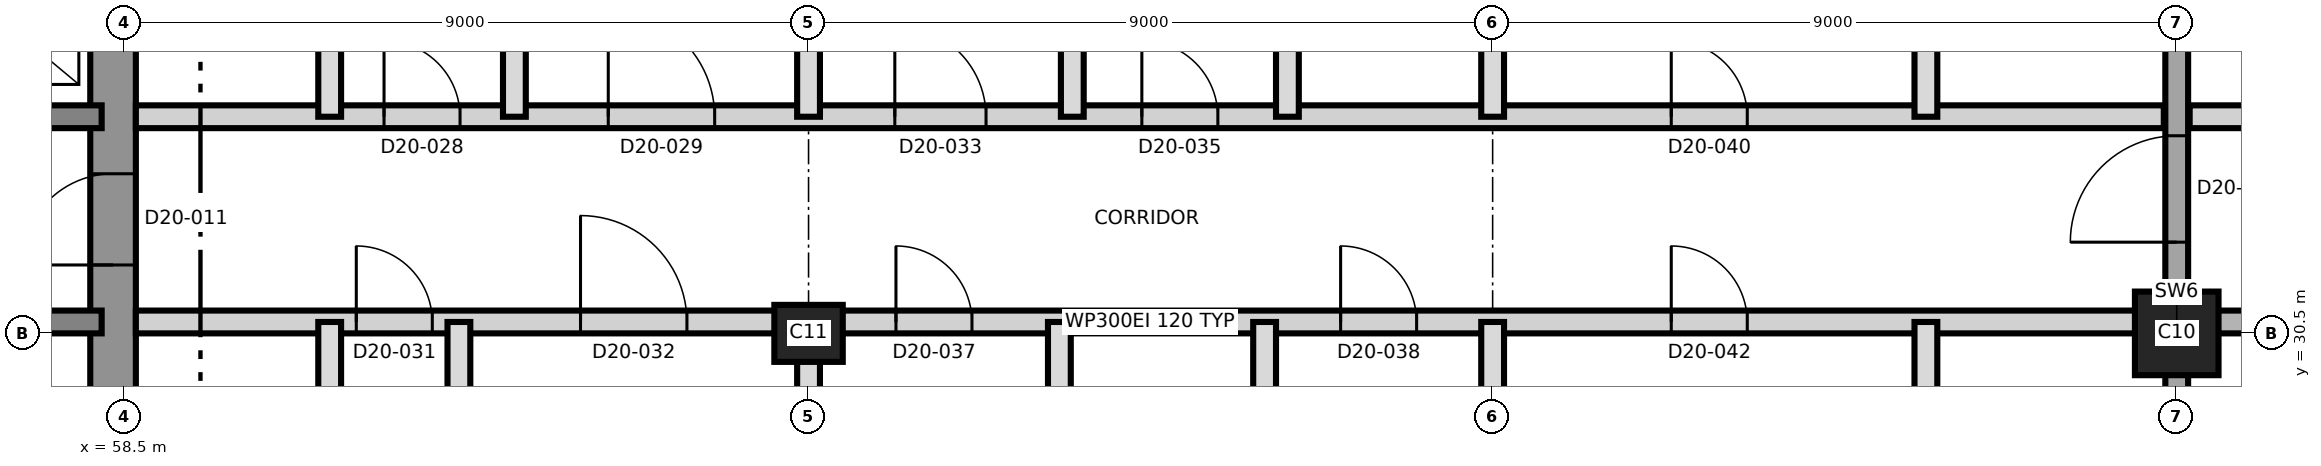
"""IFC4 building model, lengths in metres.
Left out: names, types, materials, properties, quantities, classifications, styles, units other than length and angle.
Written with IfcOpenShell. Run it as: python <this file> out.ifc"""

import sys

from ifc_helpers import new_model, si_unit, direction, frame, frame_2d, origin, origin_2d, place, context, subcontext, project, spatial, rectangle, extrude, element, fill, save


model = new_model("IFC4")
c1 = context("Model", 3, precision=1e-05, world=origin(), true_north=direction((0.0, 1.0)))
c2 = subcontext(c1, "Body", "Model", "MODEL_VIEW")
j1 = project(units=[si_unit("LENGTHUNIT", "METRE"), si_unit("PLANEANGLEUNIT", "RADIAN")], contexts=[c1])
p1 = place(None, origin())
s1 = spatial("IfcSite", under=j1, at=p1, CompositionType="ELEMENT")
p2 = place(p1, origin())
s2 = spatial("IfcBuilding", under=s1, at=p2, CompositionType="ELEMENT")
p3 = place(p2, frame((0.0, 0.0, 186.6)))
s3 = spatial("IfcBuildingStorey", under=s2, at=p3, CompositionType="ELEMENT", Elevation=186.6)
p4 = place(p3, frame((58.35, 21.2, 0.0), z_axis=(0.0, 0.0, 1.0), x_axis=(0.0, 1.0, 0.0)))
e1 = element("IfcWall", 1, at=p4, inside=s3, PredefinedType="SHEAR", context=c2, shape_type="SweptSolid", body=[
    extrude(rectangle(XDim=18.6, YDim=0.6, at=frame_2d((9.3, 0.0))), origin(), (0.0, 0.0, 1.0), 3.7),
])
p5 = place(p4, frame((10.2, 0.0, 0.0)))
e2 = element("IfcOpeningElement", 2, at=p5, cuts=e1, PredefinedType="OPENING", context=c2, shape_type="SweptSolid", body=[
    extrude(rectangle(XDim=1.2, YDim=2.1, at=frame_2d((0.6, 1.05))), frame((0.0, 0.31, 0.0), z_axis=(0.0, -1.0, 0.0), x_axis=(1.0, 0.0, 0.0)), (0.0, 0.0, 1.0), 0.62),
])
p6 = place(p3, frame((31.8, 30.65, 0.0), z_axis=(0.0, 0.0, 1.0), x_axis=(1.0, 0.0, 0.0)))
e3 = element("IfcWall", 3, at=p6, inside=s3, PredefinedType="SHEAR", context=c2, shape_type="SweptSolid", body=[
    extrude(rectangle(XDim=26.4, YDim=0.3, at=frame_2d((13.2, 0.0))), origin(), (0.0, 0.0, 1.0), 3.7),
])
p7 = place(p6, frame((24.7, 0.0, 0.0)))
e4 = element("IfcOpeningElement", 4, at=p7, cuts=e3, PredefinedType="OPENING", context=c2, shape_type="SweptSolid", body=[
    extrude(rectangle(XDim=1.0, YDim=2.1, at=frame_2d((0.5, 1.05))), frame((0.0, 0.16, 0.0), z_axis=(0.0, -1.0, 0.0), x_axis=(1.0, 0.0, 0.0)), (0.0, 0.0, 1.0), 0.32),
])
p8 = place(p6, frame((4.0, 0.0, 0.0)))
e5 = element("IfcOpeningElement", 5, at=p8, cuts=e3, PredefinedType="OPENING", context=c2, shape_type="SweptSolid", body=[
    extrude(rectangle(XDim=1.0, YDim=2.1, at=frame_2d((0.5, 1.05))), frame((0.0, 0.16, 0.0), z_axis=(0.0, -1.0, 0.0), x_axis=(1.0, 0.0, 0.0)), (0.0, 0.0, 1.0), 0.32),
])
p9 = place(p3, frame((31.8, 33.35, 0.0), z_axis=(0.0, 0.0, 1.0), x_axis=(1.0, 0.0, 0.0)))
e6 = element("IfcWall", 6, at=p9, inside=s3, PredefinedType="SHEAR", context=c2, shape_type="SweptSolid", body=[
    extrude(rectangle(XDim=26.4, YDim=0.3, at=frame_2d((13.2, 0.0))), origin(), (0.0, 0.0, 1.0), 3.7),
])
p10 = place(p9, frame((13.85, 0.0, 0.0)))
e7 = element("IfcOpeningElement", 7, at=p10, cuts=e6, PredefinedType="OPENING", context=c2, shape_type="SweptSolid", body=[
    extrude(rectangle(XDim=1.4, YDim=2.1, at=frame_2d((0.7, 1.05))), frame((0.0, 0.16, 0.0), z_axis=(0.0, -1.0, 0.0), x_axis=(1.0, 0.0, 0.0)), (0.0, 0.0, 1.0), 0.32),
])
p11 = place(p9, frame((5.325, 0.0, 0.0)))
e8 = element("IfcOpeningElement", 8, at=p11, cuts=e6, PredefinedType="OPENING", context=c2, shape_type="SweptSolid", body=[
    extrude(rectangle(XDim=1.2, YDim=2.1, at=frame_2d((0.6, 1.05))), frame((0.0, 0.16, 0.0), z_axis=(0.0, -1.0, 0.0), x_axis=(1.0, 0.0, 0.0)), (0.0, 0.0, 1.0), 0.32),
])
p12 = place(p9, frame((19.875, 0.0, 0.0)))
e9 = element("IfcOpeningElement", 9, at=p12, cuts=e6, PredefinedType="OPENING", context=c2, shape_type="SweptSolid", body=[
    extrude(rectangle(XDim=1.2, YDim=2.1, at=frame_2d((0.6, 1.05))), frame((0.0, 0.16, 0.0), z_axis=(0.0, -1.0, 0.0), x_axis=(1.0, 0.0, 0.0)), (0.0, 0.0, 1.0), 0.32),
])
p13 = place(p3, frame((67.5, 30.5, 0.0), z_axis=(0.0, 0.0, 1.0), x_axis=(1.0, 0.0, 0.0)))
e10 = element("IfcColumn", 10, at=p13, inside=s3, PredefinedType="COLUMN", context=c2, shape_type="SweptSolid", body=[
    extrude(rectangle(XDim=0.9, YDim=0.75, at=origin_2d()), origin(), (0.0, 0.0, 1.0), 3.7),
])
p14 = place(p3, frame((85.5, 30.5, 0.0), z_axis=(0.0, 0.0, 1.0), x_axis=(1.0, 0.0, 0.0)))
e11 = element("IfcColumn", 11, at=p14, inside=s3, PredefinedType="COLUMN", context=c2, shape_type="SweptSolid", body=[
    extrude(rectangle(XDim=1.1, YDim=1.1, at=origin_2d()), origin(), (0.0, 0.0, 1.0), 3.7),
])
p15 = place(p3, frame((85.5, 19.17, 0.0), z_axis=(0.0, 0.0, 1.0), x_axis=(0.0, 1.0, 0.0)))
e12 = element("IfcWall", 12, at=p15, inside=s3, PredefinedType="SHEAR", context=c2, shape_type="SweptSolid", body=[
    extrude(rectangle(XDim=22.66, YDim=0.3, at=frame_2d((11.33, 0.0))), origin(), (0.0, 0.0, 1.0), 3.7),
])
p16 = place(p15, frame((12.53, 0.0, 0.0)))
e13 = element("IfcOpeningElement", 13, at=p16, cuts=e12, PredefinedType="OPENING", context=c2, shape_type="SweptSolid", body=[
    extrude(rectangle(XDim=1.4, YDim=2.1, at=frame_2d((0.7, 1.05))), frame((0.0, 0.16, 0.0), z_axis=(0.0, -1.0, 0.0), x_axis=(1.0, 0.0, 0.0)), (0.0, 0.0, 1.0), 0.32),
])
p17 = place(p3, frame((58.65, 30.65, 0.0), z_axis=(0.0, 0.0, 1.0), x_axis=(1.0, 0.0, 0.0)))
e14 = element("IfcWall", 14, at=p17, inside=s3, PredefinedType="PARTITIONING", context=c2, shape_type="SweptSolid", body=[
    extrude(rectangle(XDim=26.68, YDim=0.3, at=frame_2d((13.34, 0.0))), origin(), (0.0, 0.0, 1.0), 3.4),
])
p18 = place(p17, frame((2.9, 0.0, 0.0)))
e15 = element("IfcOpeningElement", 15, at=p18, cuts=e14, PredefinedType="OPENING", context=c2, shape_type="SweptSolid", body=[
    extrude(rectangle(XDim=1.0, YDim=2.1, at=frame_2d((0.5, 1.05))), frame((0.0, 0.16, 0.0), z_axis=(0.0, -1.0, 0.0), x_axis=(1.0, 0.0, 0.0)), (0.0, 0.0, 1.0), 0.32),
])
p19 = place(p17, frame((5.85, 0.0, 0.0)))
e16 = element("IfcOpeningElement", 16, at=p19, cuts=e14, PredefinedType="OPENING", context=c2, shape_type="SweptSolid", body=[
    extrude(rectangle(XDim=1.4, YDim=2.1, at=frame_2d((0.7, 1.05))), frame((0.0, 0.16, 0.0), z_axis=(0.0, -1.0, 0.0), x_axis=(1.0, 0.0, 0.0)), (0.0, 0.0, 1.0), 0.32),
])
p20 = place(p17, frame((10.0, 0.0, 0.0)))
e17 = element("IfcOpeningElement", 17, at=p20, cuts=e14, PredefinedType="OPENING", context=c2, shape_type="SweptSolid", body=[
    extrude(rectangle(XDim=1.0, YDim=2.1, at=frame_2d((0.5, 1.05))), frame((0.0, 0.16, 0.0), z_axis=(0.0, -1.0, 0.0), x_axis=(1.0, 0.0, 0.0)), (0.0, 0.0, 1.0), 0.32),
])
p21 = place(p17, frame((15.85, 0.0, 0.0)))
e18 = element("IfcOpeningElement", 18, at=p21, cuts=e14, PredefinedType="OPENING", context=c2, shape_type="SweptSolid", body=[
    extrude(rectangle(XDim=1.0, YDim=2.1, at=frame_2d((0.5, 1.05))), frame((0.0, 0.16, 0.0), z_axis=(0.0, -1.0, 0.0), x_axis=(1.0, 0.0, 0.0)), (0.0, 0.0, 1.0), 0.32),
])
p22 = place(p17, frame((20.2, 0.0, 0.0)))
e19 = element("IfcOpeningElement", 19, at=p22, cuts=e14, PredefinedType="OPENING", context=c2, shape_type="SweptSolid", body=[
    extrude(rectangle(XDim=1.0, YDim=2.1, at=frame_2d((0.5, 1.05))), frame((0.0, 0.16, 0.0), z_axis=(0.0, -1.0, 0.0), x_axis=(1.0, 0.0, 0.0)), (0.0, 0.0, 1.0), 0.32),
])
p23 = place(p3, frame((85.67, 30.65, 0.0), z_axis=(0.0, 0.0, 1.0), x_axis=(1.0, 0.0, 0.0)))
e20 = element("IfcWall", 20, at=p23, inside=s3, PredefinedType="SHEAR", context=c2, shape_type="SweptSolid", body=[
    extrude(rectangle(XDim=9.58, YDim=0.3, at=frame_2d((4.79, 0.0))), origin(), (0.0, 0.0, 1.0), 3.4),
])
p24 = place(p23, frame((2.08, 0.0, 0.0)))
e21 = element("IfcOpeningElement", 21, at=p24, cuts=e20, PredefinedType="OPENING", context=c2, shape_type="SweptSolid", body=[
    extrude(rectangle(XDim=1.2, YDim=2.1, at=frame_2d((0.6, 1.05))), frame((0.0, 0.16, 0.0), z_axis=(0.0, -1.0, 0.0), x_axis=(1.0, 0.0, 0.0)), (0.0, 0.0, 1.0), 0.32),
])
p25 = place(p23, frame((5.63, 0.0, 0.0)))
e22 = element("IfcOpeningElement", 22, at=p25, cuts=e20, PredefinedType="OPENING", context=c2, shape_type="SweptSolid", body=[
    extrude(rectangle(XDim=1.0, YDim=2.1, at=frame_2d((0.5, 1.05))), frame((0.0, 0.16, 0.0), z_axis=(0.0, -1.0, 0.0), x_axis=(1.0, 0.0, 0.0)), (0.0, 0.0, 1.0), 0.32),
])
p26 = place(p3, frame((58.65, 33.35, 0.0), z_axis=(0.0, 0.0, 1.0), x_axis=(1.0, 0.0, 0.0)))
e23 = element("IfcWall", 23, at=p26, inside=s3, PredefinedType="PARTITIONING", context=c2, shape_type="SweptSolid", body=[
    extrude(rectangle(XDim=26.68, YDim=0.3, at=frame_2d((13.34, 0.0))), origin(), (0.0, 0.0, 1.0), 3.4),
])
p27 = place(p26, frame((3.265, 0.0, 0.0)))
e24 = element("IfcOpeningElement", 24, at=p27, cuts=e23, PredefinedType="OPENING", context=c2, shape_type="SweptSolid", body=[
    extrude(rectangle(XDim=1.0, YDim=2.1, at=frame_2d((0.5, 1.05))), frame((0.0, 0.16, 0.0), z_axis=(0.0, -1.0, 0.0), x_axis=(1.0, 0.0, 0.0)), (0.0, 0.0, 1.0), 0.32),
])
p28 = place(p26, frame((6.215, 0.0, 0.0)))
e25 = element("IfcOpeningElement", 25, at=p28, cuts=e23, PredefinedType="OPENING", context=c2, shape_type="SweptSolid", body=[
    extrude(rectangle(XDim=1.4, YDim=2.1, at=frame_2d((0.7, 1.05))), frame((0.0, 0.16, 0.0), z_axis=(0.0, -1.0, 0.0), x_axis=(1.0, 0.0, 0.0)), (0.0, 0.0, 1.0), 0.32),
])
p29 = place(p26, frame((9.985, 0.0, 0.0)))
e26 = element("IfcOpeningElement", 26, at=p29, cuts=e23, PredefinedType="OPENING", context=c2, shape_type="SweptSolid", body=[
    extrude(rectangle(XDim=1.2, YDim=2.1, at=frame_2d((0.6, 1.05))), frame((0.0, 0.16, 0.0), z_axis=(0.0, -1.0, 0.0), x_axis=(1.0, 0.0, 0.0)), (0.0, 0.0, 1.0), 0.32),
])
p30 = place(p26, frame((13.235, 0.0, 0.0)))
e27 = element("IfcOpeningElement", 27, at=p30, cuts=e23, PredefinedType="OPENING", context=c2, shape_type="SweptSolid", body=[
    extrude(rectangle(XDim=1.0, YDim=2.1, at=frame_2d((0.5, 1.05))), frame((0.0, 0.16, 0.0), z_axis=(0.0, -1.0, 0.0), x_axis=(1.0, 0.0, 0.0)), (0.0, 0.0, 1.0), 0.32),
])
p31 = place(p26, frame((20.2, 0.0, 0.0)))
e28 = element("IfcOpeningElement", 28, at=p31, cuts=e23, PredefinedType="OPENING", context=c2, shape_type="SweptSolid", body=[
    extrude(rectangle(XDim=1.0, YDim=2.1, at=frame_2d((0.5, 1.05))), frame((0.0, 0.16, 0.0), z_axis=(0.0, -1.0, 0.0), x_axis=(1.0, 0.0, 0.0)), (0.0, 0.0, 1.0), 0.32),
])
p32 = place(p3, frame((85.67, 33.35, 0.0), z_axis=(0.0, 0.0, 1.0), x_axis=(1.0, 0.0, 0.0)))
e29 = element("IfcWall", 29, at=p32, inside=s3, PredefinedType="PARTITIONING", context=c2, shape_type="SweptSolid", body=[
    extrude(rectangle(XDim=9.58, YDim=0.3, at=frame_2d((4.79, 0.0))), origin(), (0.0, 0.0, 1.0), 3.4),
])
p33 = place(p32, frame((1.83, 0.0, 0.0)))
e30 = element("IfcOpeningElement", 30, at=p33, cuts=e29, PredefinedType="OPENING", context=c2, shape_type="SweptSolid", body=[
    extrude(rectangle(XDim=1.0, YDim=2.1, at=frame_2d((0.5, 1.05))), frame((0.0, 0.16, 0.0), z_axis=(0.0, -1.0, 0.0), x_axis=(1.0, 0.0, 0.0)), (0.0, 0.0, 1.0), 0.32),
])
p34 = place(p32, frame((5.63, 0.0, 0.0)))
e31 = element("IfcOpeningElement", 31, at=p34, cuts=e29, PredefinedType="OPENING", context=c2, shape_type="SweptSolid", body=[
    extrude(rectangle(XDim=1.0, YDim=2.1, at=frame_2d((0.5, 1.05))), frame((0.0, 0.16, 0.0), z_axis=(0.0, -1.0, 0.0), x_axis=(1.0, 0.0, 0.0)), (0.0, 0.0, 1.0), 0.32),
])
for number, where, z_axis, x_axis in (
    (32, (61.2, 27.45, 0.0), (0.0, 0.0, 1.0), (0.0, 1.0, 0.0)),
    (33, (61.2, 33.35, 0.0), (0.0, 0.0, 1.0), (0.0, 1.0, 0.0)),
):
    element("IfcWall", number, at=place(p3, frame(where, z_axis=z_axis, x_axis=x_axis)), inside=s3, PredefinedType="PARTITIONING", context=c2, shape_type="SweptSolid", body=[
        extrude(rectangle(XDim=3.2, YDim=0.3, at=frame_2d((1.6, 0.0))), origin(), (0.0, 0.0, 1.0), 3.4),
    ])
p35 = place(p3, frame((62.9, 19.17, 0.0), z_axis=(0.0, 0.0, 1.0), x_axis=(0.0, 1.0, 0.0)))
e34 = element("IfcWall", 34, at=p35, inside=s3, PredefinedType="PARTITIONING", context=c2, shape_type="SweptSolid", body=[
    extrude(rectangle(XDim=11.48, YDim=0.3, at=frame_2d((5.74, 0.0))), origin(), (0.0, 0.0, 1.0), 3.35),
])
p36 = place(p3, frame((63.63, 33.35, 0.0), z_axis=(0.0, 0.0, 1.0), x_axis=(0.0, 1.0, 0.0)))
e35 = element("IfcWall", 35, at=p36, inside=s3, PredefinedType="PARTITIONING", context=c2, shape_type="SweptSolid", body=[
    extrude(rectangle(XDim=8.66, YDim=0.3, at=frame_2d((4.33, 0.0))), origin(), (0.0, 0.0, 1.0), 3.35),
])
p37 = place(p3, frame((67.5, 19.17, 0.0), z_axis=(0.0, 0.0, 1.0), x_axis=(0.0, 1.0, 0.0)))
e36 = element("IfcWall", 36, at=p37, inside=s3, PredefinedType="PARTITIONING", context=c2, shape_type="SweptSolid", body=[
    extrude(rectangle(XDim=11.48, YDim=0.3, at=frame_2d((5.74, 0.0))), origin(), (0.0, 0.0, 1.0), 3.35),
])
p38 = place(p3, frame((67.5, 33.35, 0.0), z_axis=(0.0, 0.0, 1.0), x_axis=(0.0, 1.0, 0.0)))
e37 = element("IfcWall", 37, at=p38, inside=s3, PredefinedType="PARTITIONING", context=c2, shape_type="SweptSolid", body=[
    extrude(rectangle(XDim=8.66, YDim=0.3, at=frame_2d((4.33, 0.0))), origin(), (0.0, 0.0, 1.0), 3.35),
])
p39 = place(p3, frame((70.8, 27.45, 0.0), z_axis=(0.0, 0.0, 1.0), x_axis=(0.0, 1.0, 0.0)))
e38 = element("IfcWall", 38, at=p39, inside=s3, PredefinedType="PARTITIONING", context=c2, shape_type="SweptSolid", body=[
    extrude(rectangle(XDim=3.2, YDim=0.3, at=frame_2d((1.6, 0.0))), origin(), (0.0, 0.0, 1.0), 3.4),
])
p40 = place(p3, frame((70.97, 33.35, 0.0), z_axis=(0.0, 0.0, 1.0), x_axis=(0.0, 1.0, 0.0)))
e39 = element("IfcWall", 39, at=p40, inside=s3, PredefinedType="PARTITIONING", context=c2, shape_type="SweptSolid", body=[
    extrude(rectangle(XDim=8.66, YDim=0.3, at=frame_2d((4.33, 0.0))), origin(), (0.0, 0.0, 1.0), 3.35),
])
p41 = place(p3, frame((73.5, 19.17, 0.0), z_axis=(0.0, 0.0, 1.0), x_axis=(0.0, 1.0, 0.0)))
e40 = element("IfcWall", 40, at=p41, inside=s3, PredefinedType="PARTITIONING", context=c2, shape_type="SweptSolid", body=[
    extrude(rectangle(XDim=11.48, YDim=0.3, at=frame_2d((5.74, 0.0))), origin(), (0.0, 0.0, 1.0), 3.35),
])
p42 = place(p3, frame((73.8, 33.35, 0.0), z_axis=(0.0, 0.0, 1.0), x_axis=(0.0, 1.0, 0.0)))
e41 = element("IfcWall", 41, at=p42, inside=s3, PredefinedType="PARTITIONING", context=c2, shape_type="SweptSolid", body=[
    extrude(rectangle(XDim=3.2, YDim=0.3, at=frame_2d((1.6, 0.0))), origin(), (0.0, 0.0, 1.0), 3.4),
])
p43 = place(p3, frame((76.5, 19.17, 0.0), z_axis=(0.0, 0.0, 1.0), x_axis=(0.0, 1.0, 0.0)))
e42 = element("IfcWall", 42, at=p43, inside=s3, PredefinedType="PARTITIONING", context=c2, shape_type="SweptSolid", body=[
    extrude(rectangle(XDim=11.48, YDim=0.3, at=frame_2d((5.74, 0.0))), origin(), (0.0, 0.0, 1.0), 3.35),
])
p44 = place(p3, frame((76.5, 33.35, 0.0), z_axis=(0.0, 0.0, 1.0), x_axis=(0.0, 1.0, 0.0)))
e43 = element("IfcWall", 43, at=p44, inside=s3, PredefinedType="PARTITIONING", context=c2, shape_type="SweptSolid", body=[
    extrude(rectangle(XDim=8.66, YDim=0.3, at=frame_2d((4.33, 0.0))), origin(), (0.0, 0.0, 1.0), 3.35),
])
for number, where, z_axis, x_axis in (
    (44, (82.2, 27.15, 0.0), (0.0, 0.0, 1.0), (0.0, 1.0, 0.0)),
    (45, (82.2, 33.35, 0.0), (0.0, 0.0, 1.0), (0.0, 1.0, 0.0)),
):
    element("IfcWall", number, at=place(p3, frame(where, z_axis=z_axis, x_axis=x_axis)), inside=s3, PredefinedType="PARTITIONING", context=c2, shape_type="SweptSolid", body=[
        extrude(rectangle(XDim=3.5, YDim=0.3, at=frame_2d((1.75, 0.0))), origin(), (0.0, 0.0, 1.0), 3.4),
    ])
p45 = place(p5, origin())
e46 = element("IfcDoor", 46, at=p45, inside=s3, OperationType="SINGLE_SWING_LEFT", PredefinedType="DOOR", context=c2, shape_type="SweptSolid", body=[
    extrude(rectangle(XDim=1.2, YDim=2.1, at=frame_2d((0.6, 1.05))), frame((0.0, 0.025, 0.0), z_axis=(0.0, -1.0, 0.0), x_axis=(1.0, 0.0, 0.0)), (0.0, 0.0, 1.0), 0.05),
])
fill(e2, e46)
p46 = place(p27, origin())
e47 = element("IfcDoor", 47, at=p46, inside=s3, OperationType="SINGLE_SWING_LEFT", PredefinedType="DOOR", context=c2, shape_type="SweptSolid", body=[
    extrude(rectangle(XDim=1.0, YDim=2.1, at=frame_2d((0.5, 1.05))), frame((0.0, 0.025, 0.0), z_axis=(0.0, -1.0, 0.0), x_axis=(1.0, 0.0, 0.0)), (0.0, 0.0, 1.0), 0.05),
])
fill(e24, e47)
p47 = place(p28, origin())
e48 = element("IfcDoor", 48, at=p47, inside=s3, OperationType="SINGLE_SWING_RIGHT", PredefinedType="DOOR", context=c2, shape_type="SweptSolid", body=[
    extrude(rectangle(XDim=1.4, YDim=2.1, at=frame_2d((0.7, 1.05))), frame((0.0, 0.025, 0.0), z_axis=(0.0, -1.0, 0.0), x_axis=(1.0, 0.0, 0.0)), (0.0, 0.0, 1.0), 0.05),
])
fill(e25, e48)
p48 = place(p18, origin())
e49 = element("IfcDoor", 49, at=p48, inside=s3, OperationType="SINGLE_SWING_LEFT", PredefinedType="DOOR", context=c2, shape_type="SweptSolid", body=[
    extrude(rectangle(XDim=1.0, YDim=2.1, at=frame_2d((0.5, 1.05))), frame((0.0, 0.025, 0.0), z_axis=(0.0, -1.0, 0.0), x_axis=(1.0, 0.0, 0.0)), (0.0, 0.0, 1.0), 0.05),
])
fill(e15, e49)
p49 = place(p19, origin())
e50 = element("IfcDoor", 50, at=p49, inside=s3, OperationType="SINGLE_SWING_RIGHT", PredefinedType="DOOR", context=c2, shape_type="SweptSolid", body=[
    extrude(rectangle(XDim=1.4, YDim=2.1, at=frame_2d((0.7, 1.05))), frame((0.0, 0.025, 0.0), z_axis=(0.0, -1.0, 0.0), x_axis=(1.0, 0.0, 0.0)), (0.0, 0.0, 1.0), 0.05),
])
fill(e16, e50)
p50 = place(p29, origin())
e51 = element("IfcDoor", 51, at=p50, inside=s3, OperationType="SINGLE_SWING_LEFT", PredefinedType="DOOR", context=c2, shape_type="SweptSolid", body=[
    extrude(rectangle(XDim=1.2, YDim=2.1, at=frame_2d((0.6, 1.05))), frame((0.0, 0.025, 0.0), z_axis=(0.0, -1.0, 0.0), x_axis=(1.0, 0.0, 0.0)), (0.0, 0.0, 1.0), 0.05),
])
fill(e26, e51)
p51 = place(p30, origin())
e52 = element("IfcDoor", 52, at=p51, inside=s3, OperationType="SINGLE_SWING_LEFT", PredefinedType="DOOR", context=c2, shape_type="SweptSolid", body=[
    extrude(rectangle(XDim=1.0, YDim=2.1, at=frame_2d((0.5, 1.05))), frame((0.0, 0.025, 0.0), z_axis=(0.0, -1.0, 0.0), x_axis=(1.0, 0.0, 0.0)), (0.0, 0.0, 1.0), 0.05),
])
fill(e27, e52)
p52 = place(p20, origin())
e53 = element("IfcDoor", 53, at=p52, inside=s3, OperationType="SINGLE_SWING_LEFT", PredefinedType="DOOR", context=c2, shape_type="SweptSolid", body=[
    extrude(rectangle(XDim=1.0, YDim=2.1, at=frame_2d((0.5, 1.05))), frame((0.0, 0.025, 0.0), z_axis=(0.0, -1.0, 0.0), x_axis=(1.0, 0.0, 0.0)), (0.0, 0.0, 1.0), 0.05),
])
fill(e17, e53)
p53 = place(p21, origin())
e54 = element("IfcDoor", 54, at=p53, inside=s3, OperationType="SINGLE_SWING_RIGHT", PredefinedType="DOOR", context=c2, shape_type="SweptSolid", body=[
    extrude(rectangle(XDim=1.0, YDim=2.1, at=frame_2d((0.5, 1.05))), frame((0.0, 0.025, 0.0), z_axis=(0.0, -1.0, 0.0), x_axis=(1.0, 0.0, 0.0)), (0.0, 0.0, 1.0), 0.05),
])
fill(e18, e54)
p54 = place(p31, origin())
e55 = element("IfcDoor", 55, at=p54, inside=s3, OperationType="SINGLE_SWING_LEFT", PredefinedType="DOOR", context=c2, shape_type="SweptSolid", body=[
    extrude(rectangle(XDim=1.0, YDim=2.1, at=frame_2d((0.5, 1.05))), frame((0.0, 0.025, 0.0), z_axis=(0.0, -1.0, 0.0), x_axis=(1.0, 0.0, 0.0)), (0.0, 0.0, 1.0), 0.05),
])
fill(e28, e55)
p55 = place(p22, origin())
e56 = element("IfcDoor", 56, at=p55, inside=s3, OperationType="SINGLE_SWING_RIGHT", PredefinedType="DOOR", context=c2, shape_type="SweptSolid", body=[
    extrude(rectangle(XDim=1.0, YDim=2.1, at=frame_2d((0.5, 1.05))), frame((0.0, 0.025, 0.0), z_axis=(0.0, -1.0, 0.0), x_axis=(1.0, 0.0, 0.0)), (0.0, 0.0, 1.0), 0.05),
])
fill(e19, e56)
p56 = place(p16, origin())
e57 = element("IfcDoor", 57, at=p56, inside=s3, OperationType="SINGLE_SWING_RIGHT", PredefinedType="DOOR", context=c2, shape_type="SweptSolid", body=[
    extrude(rectangle(XDim=1.4, YDim=2.1, at=frame_2d((0.7, 1.05))), frame((0.0, 0.025, 0.0), z_axis=(0.0, -1.0, 0.0), x_axis=(1.0, 0.0, 0.0)), (0.0, 0.0, 1.0), 0.05),
])
fill(e13, e57)
save(model, sys.argv[1])
